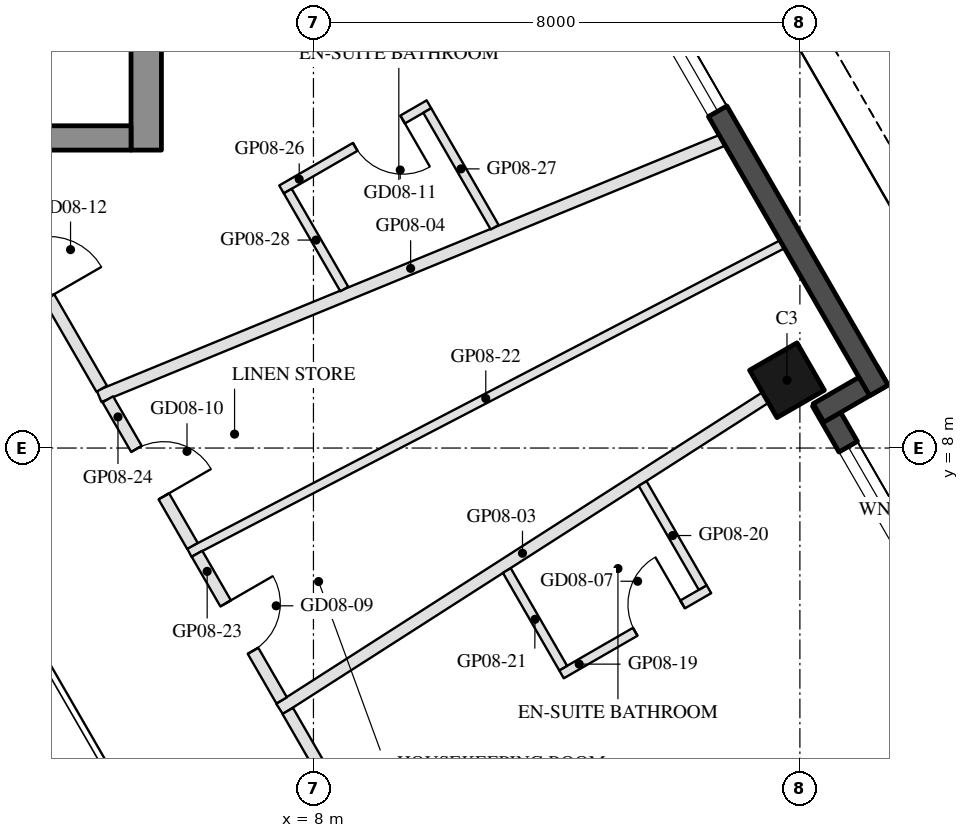
"""IFC4 building model, lengths in metres.
Left out: names, types, materials, properties, quantities, classifications, styles, units other than length and angle.
Written with IfcOpenShell. Run it as: python <this file> out.ifc"""

import sys

from ifc_helpers import new_model, si_unit, direction, frame, frame_2d, origin, origin_2d, place, context, subcontext, project, spatial, rectangle, hollow_rectangle, extrude, element, fill, save


model = new_model("IFC4")
c1 = context("Model", 3, precision=1e-05, world=origin(), true_north=direction((0.0, 1.0)))
c2 = subcontext(c1, "Body", "Model", "MODEL_VIEW")
j1 = project(units=[si_unit("LENGTHUNIT", "METRE"), si_unit("PLANEANGLEUNIT", "RADIAN")], contexts=[c1])
p1 = place(None, origin())
s1 = spatial("IfcSite", under=j1, at=p1, CompositionType="ELEMENT")
p2 = place(p1, origin())
s2 = spatial("IfcBuilding", under=s1, at=p2, CompositionType="ELEMENT")
p3 = place(p2, frame((0.0, 0.0, 102.0)))
s3 = spatial("IfcBuildingStorey", under=s2, at=p3, CompositionType="ELEMENT", Elevation=102.0)
p4 = place(p3, frame((15.788, 9.115, 0.0), z_axis=(0.0, 0.0, 1.0), x_axis=(-0.5, 0.866025403784, 0.0)))
e1 = element("IfcColumn", 1, at=p4, inside=s3, PredefinedType="COLUMN", context=c2, shape_type="SweptSolid", body=[
    extrude(hollow_rectangle(XDim=0.9, YDim=0.9, WallThickness=0.04, at=origin_2d()), origin(), (0.0, 0.0, 1.0), 3.7),
])
p5 = place(p3, frame((19.729, 2.938, 0.0), z_axis=(0.0, 0.0, 1.0), x_axis=(-0.499976430342, 0.866039011305, 0.0)))
e2 = element("IfcWall", 2, at=p5, inside=s3, PredefinedType="SOLIDWALL", context=c2, shape_type="SweptSolid", body=[
    extrude(rectangle(XDim=6.74, YDim=0.35, at=frame_2d((3.37, 0.0))), origin(), (0.0, 0.0, 1.0), 3.55),
])
p6 = place(p5, frame((0.77, 0.0, 0.3)))
e3 = element("IfcOpeningElement", 3, at=p6, cuts=e2, PredefinedType="OPENING", context=c2, shape_type="SweptSolid", body=[
    extrude(rectangle(XDim=2.4, YDim=2.65, at=frame_2d((1.2, 1.325))), frame((0.0, 0.185, 0.0), z_axis=(0.0, -1.0, 0.0), x_axis=(1.0, 0.0, 0.0)), (0.0, 0.0, 1.0), 0.37),
])
p7 = place(p5, frame((3.47, 0.0, 0.3)))
e4 = element("IfcOpeningElement", 4, at=p7, cuts=e2, PredefinedType="OPENING", context=c2, shape_type="SweptSolid", body=[
    extrude(rectangle(XDim=2.4, YDim=2.65, at=frame_2d((1.2, 1.325))), frame((0.0, 0.185, 0.0), z_axis=(0.0, -1.0, 0.0), x_axis=(1.0, 0.0, 0.0)), (0.0, 0.0, 1.0), 0.37),
])
p8 = place(p3, frame((16.306, 8.577, 0.0), z_axis=(0.0, 0.0, 1.0), x_axis=(0.866092288191, 0.499884134912, 0.0)))
e5 = element("IfcWall", 5, at=p8, inside=s3, PredefinedType="SOLIDWALL", context=c2, shape_type="SweptSolid", body=[
    extrude(rectangle(XDim=1.22, YDim=0.35, at=frame_2d((0.61, 0.0))), origin(), (0.0, 0.0, 1.0), 3.55),
])
p9 = place(p3, frame((17.299, 8.948, 0.0), z_axis=(0.0, 0.0, 1.0), x_axis=(-0.500010041276, 0.866019606374, 0.0)))
e6 = element("IfcWall", 6, at=p9, inside=s3, PredefinedType="SOLIDWALL", context=c2, shape_type="SweptSolid", body=[
    extrude(rectangle(XDim=9.7, YDim=0.35, at=frame_2d((4.85, 0.0))), origin(), (0.0, 0.0, 1.0), 3.55),
])
p10 = place(p9, frame((5.301, 0.0, 0.3)))
e7 = element("IfcOpeningElement", 7, at=p10, cuts=e6, PredefinedType="OPENING", context=c2, shape_type="SweptSolid", body=[
    extrude(rectangle(XDim=2.6, YDim=2.65, at=frame_2d((1.3, 1.325))), frame((0.0, 0.185, 0.0), z_axis=(0.0, -1.0, 0.0), x_axis=(1.0, 0.0, 0.0)), (0.0, 0.0, 1.0), 0.37),
])
p11 = place(p3, frame((5.25, 12.9, 0.0), z_axis=(0.0, 0.0, 1.0), x_axis=(0.0, 1.0, 0.0)))
e8 = element("IfcWall", 8, at=p11, inside=s3, PredefinedType="SHEAR", context=c2, shape_type="SweptSolid", body=[
    extrude(rectangle(XDim=14.837, YDim=0.5, at=frame_2d((7.418, 0.0))), origin(), (0.0, 0.0, 1.0), 3.5),
])
p12 = place(p3, frame((5.0, 13.1, 0.0), z_axis=(0.0, 0.0, 1.0), x_axis=(-1.0, 0.0, 0.0)))
e9 = element("IfcWall", 9, at=p12, inside=s3, PredefinedType="SHEAR", context=c2, shape_type="SweptSolid", body=[
    extrude(rectangle(XDim=10.0, YDim=0.4, at=frame_2d((5.0, 0.0))), origin(), (0.0, 0.0, 1.0), 3.5),
])
p13 = place(p12, frame((3.55, 0.0, 0.0)))
e10 = element("IfcOpeningElement", 10, at=p13, cuts=e9, PredefinedType="OPENING", context=c2, shape_type="SweptSolid", body=[
    extrude(rectangle(XDim=1.1, YDim=2.1, at=frame_2d((0.55, 1.05))), frame((0.0, 0.21, 0.0), z_axis=(0.0, -1.0, 0.0), x_axis=(1.0, 0.0, 0.0)), (0.0, 0.0, 1.0), 0.42),
])
p14 = place(p12, frame((5.85, 0.0, 0.0)))
e11 = element("IfcOpeningElement", 11, at=p14, cuts=e9, PredefinedType="OPENING", context=c2, shape_type="SweptSolid", body=[
    extrude(rectangle(XDim=1.4, YDim=2.1, at=frame_2d((0.7, 1.05))), frame((0.0, 0.21, 0.0), z_axis=(0.0, -1.0, 0.0), x_axis=(1.0, 0.0, 0.0)), (0.0, 0.0, 1.0), 0.42),
])
p15 = place(p3, frame((15.433, 8.83, 0.0), z_axis=(0.0, 0.0, 1.0), x_axis=(-0.841935777146, -0.539577748949, 0.0)))
e12 = element("IfcWall", 12, at=p15, inside=s3, PredefinedType="PARTITIONING", context=c2, shape_type="SweptSolid", body=[
    extrude(rectangle(XDim=9.49, YDim=0.2, at=frame_2d((4.745, 0.0))), origin(), (0.0, 0.0, 1.0), 2.95),
])
p16 = place(p3, frame((14.722, 13.061, 0.0), z_axis=(0.0, 0.0, 1.0), x_axis=(-0.9249494111, -0.380090235214, 0.0)))
e13 = element("IfcWall", 13, at=p16, inside=s3, PredefinedType="PARTITIONING", context=c2, shape_type="SweptSolid", body=[
    extrude(rectangle(XDim=11.079, YDim=0.2, at=frame_2d((5.54, 0.0))), origin(), (0.0, 0.0, 1.0), 2.95),
])
p17 = place(p3, frame((7.577, 3.676, 0.0), z_axis=(0.0, 0.0, 1.0), x_axis=(0.500017489778, -0.866015305821, 0.0)))
e14 = element("IfcWall", 14, at=p17, inside=s3, PredefinedType="PARTITIONING", context=c2, shape_type="SweptSolid", body=[
    extrude(rectangle(XDim=9.384, YDim=0.2, at=frame_2d((4.692, 0.0))), origin(), (0.0, 0.0, 1.0), 2.95),
])
p18 = place(p17, frame((4.192, 0.0, 0.0)))
e15 = element("IfcOpeningElement", 15, at=p18, cuts=e14, PredefinedType="OPENING", context=c2, shape_type="SweptSolid", body=[
    extrude(rectangle(XDim=1.0, YDim=2.1, at=frame_2d((0.5, 1.05))), frame((0.0, 0.11, 0.0), z_axis=(0.0, -1.0, 0.0), x_axis=(1.0, 0.0, 0.0)), (0.0, 0.0, 1.0), 0.22),
])
p19 = place(p3, frame((12.079, 4.278, 0.0), z_axis=(0.0, 0.0, 1.0), x_axis=(0.866018616679, 0.500011755427, 0.0)))
e16 = element("IfcWall", 16, at=p19, inside=s3, PredefinedType="PARTITIONING", context=c2, shape_type="SweptSolid", body=[
    extrude(rectangle(XDim=2.8, YDim=0.15, at=frame_2d((1.4, 0.0))), origin(), (0.0, 0.0, 1.0), 3.55),
])
p20 = place(p19, frame((1.4, 0.0, 0.0)))
e17 = element("IfcOpeningElement", 17, at=p20, cuts=e16, PredefinedType="OPENING", context=c2, shape_type="SweptSolid", body=[
    extrude(rectangle(XDim=0.9, YDim=2.1, at=frame_2d((0.45, 1.05))), frame((0.0, 0.085, 0.0), z_axis=(0.0, -1.0, 0.0), x_axis=(1.0, 0.0, 0.0)), (0.0, 0.0, 1.0), 0.17),
])
p21 = place(p3, frame((14.402, 5.705, 0.0), z_axis=(0.0, 0.0, 1.0), x_axis=(-0.500018274647, 0.866014852655, 0.0)))
e18 = element("IfcWall", 18, at=p21, inside=s3, PredefinedType="PARTITIONING", context=c2, shape_type="SweptSolid", body=[
    extrude(rectangle(XDim=1.977, YDim=0.15, at=frame_2d((0.988, 0.0))), origin(), (0.0, 0.0, 1.0), 3.55),
])
p22 = place(p3, frame((12.107, 4.38, 0.0), z_axis=(0.0, 0.0, 1.0), x_axis=(-0.499893495202, 0.866086885627, 0.0)))
e19 = element("IfcWall", 19, at=p22, inside=s3, PredefinedType="PARTITIONING", context=c2, shape_type="SweptSolid", body=[
    extrude(rectangle(XDim=1.854, YDim=0.15, at=frame_2d((0.927, 0.0))), origin(), (0.0, 0.0, 1.0), 3.55),
])
p23 = place(p3, frame((15.709, 11.35, 0.0), z_axis=(0.0, 0.0, 1.0), x_axis=(-0.887196797294, -0.461391203721, 0.0)))
e20 = element("IfcWall", 20, at=p23, inside=s3, PredefinedType="PARTITIONING", context=c2, shape_type="SweptSolid", body=[
    extrude(rectangle(XDim=10.991, YDim=0.15, at=frame_2d((5.495, 0.0))), origin(), (0.0, 0.0, 1.0), 2.96),
])
p24 = place(p3, frame((6.085, 6.26, 0.0), z_axis=(0.0, 0.0, 1.0), x_axis=(0.499978037009, -0.866038083752, 0.0)))
e21 = element("IfcWall", 21, at=p24, inside=s3, PredefinedType="PARTITIONING", context=c2, shape_type="SweptSolid", body=[
    extrude(rectangle(XDim=2.784, YDim=0.2, at=frame_2d((1.392, 0.0))), origin(), (0.0, 0.0, 1.0), 2.95),
])
p25 = place(p24, frame((0.942, 0.0, 0.0)))
e22 = element("IfcOpeningElement", 22, at=p25, cuts=e21, PredefinedType="OPENING", context=c2, shape_type="SweptSolid", body=[
    extrude(rectangle(XDim=0.9, YDim=2.1, at=frame_2d((0.45, 1.05))), frame((0.0, 0.11, 0.0), z_axis=(0.0, -1.0, 0.0), x_axis=(1.0, 0.0, 0.0)), (0.0, 0.0, 1.0), 0.22),
])
p26 = place(p3, frame((4.618, 8.801, 0.0), z_axis=(0.0, 0.0, 1.0), x_axis=(0.499988210251, -0.866032210492, 0.0)))
e23 = element("IfcWall", 23, at=p26, inside=s3, PredefinedType="PARTITIONING", context=c2, shape_type="SweptSolid", body=[
    extrude(rectangle(XDim=2.783, YDim=0.2, at=frame_2d((1.392, 0.0))), origin(), (0.0, 0.0, 1.0), 2.95),
])
p27 = place(p26, frame((0.942, 0.0, 0.0)))
e24 = element("IfcOpeningElement", 24, at=p27, cuts=e23, PredefinedType="OPENING", context=c2, shape_type="SweptSolid", body=[
    extrude(rectangle(XDim=0.9, YDim=2.1, at=frame_2d((0.45, 1.05))), frame((0.0, 0.11, 0.0), z_axis=(0.0, -1.0, 0.0), x_axis=(1.0, 0.0, 0.0)), (0.0, 0.0, 1.0), 0.22),
])
p28 = place(p3, frame((2.281, 12.85, 0.0), z_axis=(0.0, 0.0, 1.0), x_axis=(0.499977539641, -0.866038370891, 0.0)))
e25 = element("IfcWall", 25, at=p28, inside=s3, PredefinedType="PARTITIONING", context=c2, shape_type="SweptSolid", body=[
    extrude(rectangle(XDim=4.474, YDim=0.2, at=frame_2d((2.237, 0.0))), origin(), (0.0, 0.0, 1.0), 2.95),
])
p29 = place(p28, frame((1.737, 0.0, 0.0)))
e26 = element("IfcOpeningElement", 26, at=p29, cuts=e25, PredefinedType="OPENING", context=c2, shape_type="SweptSolid", body=[
    extrude(rectangle(XDim=1.0, YDim=2.1, at=frame_2d((0.5, 1.05))), frame((0.0, 0.11, 0.0), z_axis=(0.0, -1.0, 0.0), x_axis=(1.0, 0.0, 0.0)), (0.0, 0.0, 1.0), 0.22),
])
p30 = place(p3, frame((9.9, 13.653, 0.0), z_axis=(0.0, 0.0, 1.0), x_axis=(-0.866056369097, -0.49994636267, 0.0)))
e27 = element("IfcWall", 27, at=p30, inside=s3, PredefinedType="PARTITIONING", context=c2, shape_type="SweptSolid", body=[
    extrude(rectangle(XDim=2.8, YDim=0.15, at=frame_2d((1.4, 0.0))), origin(), (0.0, 0.0, 1.0), 3.55),
])
p31 = place(p30, frame((0.5, 0.0, 0.0)))
e28 = element("IfcOpeningElement", 28, at=p31, cuts=e27, PredefinedType="OPENING", context=c2, shape_type="SweptSolid", body=[
    extrude(rectangle(XDim=0.9, YDim=2.1, at=frame_2d((0.45, 1.05))), frame((0.0, 0.085, 0.0), z_axis=(0.0, -1.0, 0.0), x_axis=(1.0, 0.0, 0.0)), (0.0, 0.0, 1.0), 0.17),
])
p32 = place(p3, frame((10.98, 11.631, 0.0), z_axis=(0.0, 0.0, 1.0), x_axis=(-0.500024353964, 0.86601134256, 0.0)))
e29 = element("IfcWall", 29, at=p32, inside=s3, PredefinedType="PARTITIONING", context=c2, shape_type="SweptSolid", body=[
    extrude(rectangle(XDim=2.217, YDim=0.15, at=frame_2d((1.108, 0.0))), origin(), (0.0, 0.0, 1.0), 3.55),
])
p33 = place(p3, frame((8.507, 10.615, 0.0), z_axis=(0.0, 0.0, 1.0), x_axis=(-0.499908018857, 0.866078502609, 0.0)))
e30 = element("IfcWall", 30, at=p33, inside=s3, PredefinedType="PARTITIONING", context=c2, shape_type="SweptSolid", body=[
    extrude(rectangle(XDim=1.86, YDim=0.15, at=frame_2d((0.93, 0.0))), origin(), (0.0, 0.0, 1.0), 3.55),
])
p34 = place(p7, origin())
e31 = element("IfcWindow", 31, at=p34, inside=s3, PartitioningType="SINGLE_PANEL", PredefinedType="WINDOW", context=c2, shape_type="SweptSolid", body=[
    extrude(rectangle(XDim=2.4, YDim=2.65, at=frame_2d((1.2, 1.325))), frame((0.0, 0.03, 0.0), z_axis=(0.0, -1.0, 0.0), x_axis=(1.0, 0.0, 0.0)), (0.0, 0.0, 1.0), 0.06),
])
fill(e4, e31)
p35 = place(p10, origin())
e32 = element("IfcWindow", 32, at=p35, inside=s3, PartitioningType="SINGLE_PANEL", PredefinedType="WINDOW", context=c2, shape_type="SweptSolid", body=[
    extrude(rectangle(XDim=2.6, YDim=2.65, at=frame_2d((1.3, 1.325))), frame((0.0, 0.03, 0.0), z_axis=(0.0, -1.0, 0.0), x_axis=(1.0, 0.0, 0.0)), (0.0, 0.0, 1.0), 0.06),
])
fill(e7, e32)
p36 = place(p20, origin())
e33 = element("IfcDoor", 33, at=p36, inside=s3, OperationType="SINGLE_SWING_RIGHT", PredefinedType="DOOR", context=c2, shape_type="SweptSolid", body=[
    extrude(rectangle(XDim=0.9, YDim=2.1, at=frame_2d((0.45, 1.05))), frame((0.0, 0.025, 0.0), z_axis=(0.0, -1.0, 0.0), x_axis=(1.0, 0.0, 0.0)), (0.0, 0.0, 1.0), 0.05),
])
fill(e17, e33)
p37 = place(p25, origin())
e34 = element("IfcDoor", 34, at=p37, inside=s3, OperationType="SINGLE_SWING_LEFT", PredefinedType="DOOR", context=c2, shape_type="SweptSolid", body=[
    extrude(rectangle(XDim=0.9, YDim=2.1, at=frame_2d((0.45, 1.05))), frame((0.0, 0.025, 0.0), z_axis=(0.0, -1.0, 0.0), x_axis=(1.0, 0.0, 0.0)), (0.0, 0.0, 1.0), 0.05),
])
fill(e22, e34)
p38 = place(p27, origin())
e35 = element("IfcDoor", 35, at=p38, inside=s3, OperationType="SINGLE_SWING_RIGHT", PredefinedType="DOOR", context=c2, shape_type="SweptSolid", body=[
    extrude(rectangle(XDim=0.9, YDim=2.1, at=frame_2d((0.45, 1.05))), frame((0.0, 0.025, 0.0), z_axis=(0.0, -1.0, 0.0), x_axis=(1.0, 0.0, 0.0)), (0.0, 0.0, 1.0), 0.05),
])
fill(e24, e35)
p39 = place(p31, origin())
e36 = element("IfcDoor", 36, at=p39, inside=s3, OperationType="SINGLE_SWING_LEFT", PredefinedType="DOOR", context=c2, shape_type="SweptSolid", body=[
    extrude(rectangle(XDim=0.9, YDim=2.1, at=frame_2d((0.45, 1.05))), frame((0.0, 0.025, 0.0), z_axis=(0.0, -1.0, 0.0), x_axis=(1.0, 0.0, 0.0)), (0.0, 0.0, 1.0), 0.05),
])
fill(e28, e36)
save(model, sys.argv[1])
